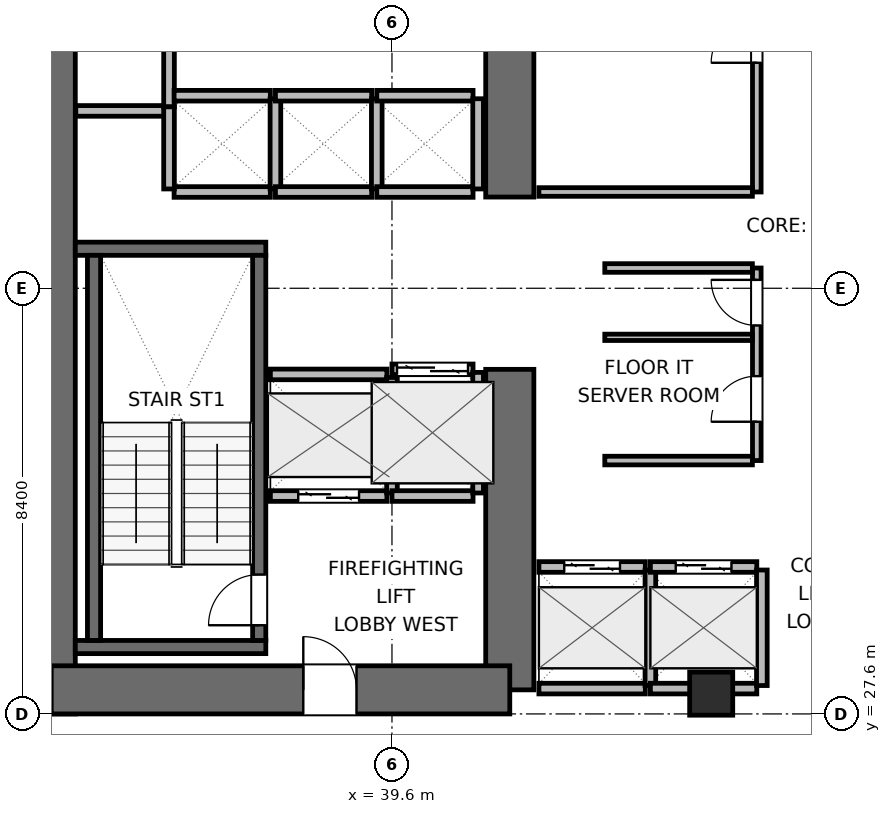
"""IFC4 building model, lengths in metres.
Left out: names, types, materials, properties, quantities, classifications, styles, units other than length and angle.
Written with IfcOpenShell. Run it as: python <this file> out.ifc"""

import sys

from ifc_helpers import new_model, si_unit, direction, frame, frame_2d, origin, origin_2d, place, context, subcontext, project, spatial, rectangle, extrude, element, fill, save


model = new_model("IFC4")
c1 = context("Model", 3, precision=1e-05, world=origin(), true_north=direction((0.0, 1.0)))
c2 = subcontext(c1, "Body", "Model", "MODEL_VIEW")
j1 = project(units=[si_unit("LENGTHUNIT", "METRE"), si_unit("PLANEANGLEUNIT", "RADIAN")], contexts=[c1])
p1 = place(None, origin())
s1 = spatial("IfcSite", under=j1, at=p1, CompositionType="ELEMENT")
p2 = place(p1, origin())
s2 = spatial("IfcBuilding", under=s1, at=p2, CompositionType="ELEMENT")
p3 = place(p2, frame((0.0, 0.0, 48.9)))
s3 = spatial("IfcBuildingStorey", under=s2, at=p3, CompositionType="ELEMENT", Elevation=48.9)
p4 = place(p3, frame((32.875, 27.6, 0.0), z_axis=(0.0, 0.0, 1.0), x_axis=(0.0, 1.0, 0.0)))
e1 = element("IfcWall", 1, at=p4, inside=s3, PredefinedType="SHEAR", context=c2, shape_type="SweptSolid", body=[
    extrude(rectangle(XDim=16.8, YDim=0.95, at=frame_2d((8.4, 0.0))), origin(), (0.0, 0.0, 1.0), 3.9),
])
p5 = place(p3, frame((41.925, 28.075, 0.0), z_axis=(0.0, 0.0, 1.0), x_axis=(0.0, 1.0, 0.0)))
e2 = element("IfcWall", 2, at=p5, inside=s3, PredefinedType="SHEAR", context=c2, shape_type="SweptSolid", body=[
    extrude(rectangle(XDim=6.325, YDim=0.95, at=frame_2d((3.163, 0.0))), origin(), (0.0, 0.0, 1.0), 3.9),
])
p6 = place(p3, frame((41.925, 37.8, 0.0), z_axis=(0.0, 0.0, 1.0), x_axis=(0.0, 1.0, 0.0)))
e3 = element("IfcWall", 3, at=p6, inside=s3, PredefinedType="SHEAR", context=c2, shape_type="SweptSolid", body=[
    extrude(rectangle(XDim=6.125, YDim=0.95, at=frame_2d((3.062, 0.0))), origin(), (0.0, 0.0, 1.0), 3.9),
])
p7 = place(p3, frame((32.875, 28.075, 0.0), z_axis=(0.0, 0.0, 1.0), x_axis=(1.0, 0.0, 0.0)))
e4 = element("IfcWall", 4, at=p7, inside=s3, PredefinedType="SHEAR", context=c2, shape_type="SweptSolid", body=[
    extrude(rectangle(XDim=9.05, YDim=0.95, at=frame_2d((4.525, 0.0))), origin(), (0.0, 0.0, 1.0), 3.9),
])
p8 = place(p7, frame((4.975, 0.0, 0.0)))
e5 = element("IfcOpeningElement", 5, at=p8, cuts=e4, PredefinedType="OPENING", context=c2, shape_type="SweptSolid", body=[
    extrude(rectangle(XDim=1.05, YDim=2.04, at=frame_2d((0.525, 1.02))), frame((0.0, 0.485, 0.0), z_axis=(0.0, -1.0, 0.0), x_axis=(1.0, 0.0, 0.0)), (0.0, 0.0, 1.0), 0.97),
])
for number, where, z_axis, x_axis in (
    (6, (33.35, 28.92, 0.0), (0.0, 0.0, 1.0), (1.0, 0.0, 0.0)),
    (7, (33.35, 36.78, 0.0), (0.0, 0.0, 1.0), (1.0, 0.0, 0.0)),
):
    element("IfcWall", number, at=place(p3, frame(where, z_axis=z_axis, x_axis=x_axis)), inside=s3, PredefinedType="SHEAR", context=c2, shape_type="SweptSolid", body=[
        extrude(rectangle(XDim=3.76, YDim=0.26, at=frame_2d((1.88, 0.0))), origin(), (0.0, 0.0, 1.0), 3.9),
    ])
p9 = place(p3, frame((33.72, 29.05, 0.0), z_axis=(0.0, 0.0, 1.0), x_axis=(0.0, 1.0, 0.0)))
e8 = element("IfcWall", 8, at=p9, inside=s3, PredefinedType="SHEAR", context=c2, shape_type="SweptSolid", body=[
    extrude(rectangle(XDim=7.6, YDim=0.26, at=frame_2d((3.8, 0.0))), origin(), (0.0, 0.0, 1.0), 3.9),
])
p10 = place(p3, frame((36.98, 29.05, 0.0), z_axis=(0.0, 0.0, 1.0), x_axis=(0.0, 1.0, 0.0)))
e9 = element("IfcWall", 9, at=p10, inside=s3, PredefinedType="SHEAR", context=c2, shape_type="SweptSolid", body=[
    extrude(rectangle(XDim=7.6, YDim=0.26, at=frame_2d((3.8, 0.0))), origin(), (0.0, 0.0, 1.0), 3.9),
])
p11 = place(p10, frame((0.3, 0.0, 0.0)))
e10 = element("IfcOpeningElement", 10, at=p11, cuts=e9, PredefinedType="OPENING", context=c2, shape_type="SweptSolid", body=[
    extrude(rectangle(XDim=1.0, YDim=2.04, at=frame_2d((0.5, 1.02))), frame((0.0, 0.14, 0.0), z_axis=(0.0, -1.0, 0.0), x_axis=(1.0, 0.0, 0.0)), (0.0, 0.0, 1.0), 0.28),
])
p12 = place(p3, frame((45.9, 28.0, 0.0), z_axis=(0.0, 0.0, 1.0), x_axis=(1.0, 0.0, 0.0)))
e11 = element("IfcColumn", 11, at=p12, inside=s3, PredefinedType="COLUMN", context=c2, shape_type="SweptSolid", body=[
    extrude(rectangle(XDim=0.85, YDim=0.85, at=origin_2d()), origin(), (0.0, 0.0, 1.0), 3.9),
])
p13 = place(p3, frame((33.36, 39.5, 0.0), z_axis=(0.0, 0.0, 1.0), x_axis=(1.0, 0.0, 0.0)))
e12 = element("IfcWall", 12, at=p13, inside=s3, PredefinedType="PARTITIONING", context=c2, shape_type="SweptSolid", body=[
    extrude(rectangle(XDim=1.86, YDim=0.21, at=frame_2d((0.93, 0.0))), origin(), (0.0, 0.0, 1.0), 3.64),
])
p14 = place(p3, frame((35.2, 39.58, 0.0), z_axis=(0.0, 0.0, 1.0), x_axis=(0.0, 1.0, 0.0)))
e13 = element("IfcWall", 13, at=p14, inside=s3, PredefinedType="PARTITIONING", context=c2, shape_type="SweptSolid", body=[
    extrude(rectangle(XDim=1.32, YDim=0.21, at=frame_2d((0.66, 0.0))), origin(), (0.0, 0.0, 1.0), 3.64),
])
p15 = place(p3, frame((37.2, 31.9, 0.0), z_axis=(0.0, 0.0, 1.0), x_axis=(1.0, 0.0, 0.0)))
e14 = element("IfcWall", 14, at=p15, inside=s3, PredefinedType="PARTITIONING", context=c2, shape_type="SweptSolid", body=[
    extrude(rectangle(XDim=2.3, YDim=0.21, at=frame_2d((1.15, 0.0))), origin(), (0.0, 0.0, 1.0), 3.64),
])
p16 = place(p15, frame((0.55, 0.0, 0.0)))
e15 = element("IfcOpeningElement", 15, at=p16, cuts=e14, PredefinedType="OPENING", context=c2, shape_type="SweptSolid", body=[
    extrude(rectangle(XDim=1.2, YDim=2.04, at=frame_2d((0.6, 1.02))), frame((0.0, 0.115, 0.0), z_axis=(0.0, -1.0, 0.0), x_axis=(1.0, 0.0, 0.0)), (0.0, 0.0, 1.0), 0.23),
])
p17 = place(p3, frame((37.2, 34.3, 0.0), z_axis=(0.0, 0.0, 1.0), x_axis=(1.0, 0.0, 0.0)))
e16 = element("IfcWall", 16, at=p17, inside=s3, PredefinedType="PARTITIONING", context=c2, shape_type="SweptSolid", body=[
    extrude(rectangle(XDim=2.3, YDim=0.21, at=frame_2d((1.15, 0.0))), origin(), (0.0, 0.0, 1.0), 3.64),
])
p18 = place(p3, frame((39.6, 31.96, 0.0), z_axis=(0.0, 0.0, 1.0), x_axis=(0.0, 1.0, 0.0)))
e17 = element("IfcWall", 17, at=p18, inside=s3, PredefinedType="PARTITIONING", context=c2, shape_type="SweptSolid", body=[
    extrude(rectangle(XDim=2.28, YDim=0.21, at=frame_2d((1.14, 0.0))), origin(), (0.0, 0.0, 1.0), 3.64),
])
p19 = place(p3, frame((39.6, 34.4, 0.0), z_axis=(0.0, 0.0, 1.0), x_axis=(1.0, 0.0, 0.0)))
e18 = element("IfcWall", 18, at=p19, inside=s3, PredefinedType="PARTITIONING", context=c2, shape_type="SweptSolid", body=[
    extrude(rectangle(XDim=1.6, YDim=0.21, at=frame_2d((0.8, 0.0))), origin(), (0.0, 0.0, 1.0), 3.64),
])
p20 = place(p19, frame((0.1, 0.0, 0.0)))
e19 = element("IfcOpeningElement", 19, at=p20, cuts=e18, PredefinedType="OPENING", context=c2, shape_type="SweptSolid", body=[
    extrude(rectangle(XDim=1.4, YDim=2.06, at=frame_2d((0.7, 1.03))), frame((0.0, 0.115, 0.0), z_axis=(0.0, -1.0, 0.0), x_axis=(1.0, 0.0, 0.0)), (0.0, 0.0, 1.0), 0.23),
])
p21 = place(p3, frame((39.6, 31.9, 0.0), z_axis=(0.0, 0.0, 1.0), x_axis=(1.0, 0.0, 0.0)))
e20 = element("IfcWall", 20, at=p21, inside=s3, PredefinedType="PARTITIONING", context=c2, shape_type="SweptSolid", body=[
    extrude(rectangle(XDim=1.6, YDim=0.21, at=frame_2d((0.8, 0.0))), origin(), (0.0, 0.0, 1.0), 3.64),
])
p22 = place(p3, frame((41.3, 31.96, 0.0), z_axis=(0.0, 0.0, 1.0), x_axis=(0.0, 1.0, 0.0)))
e21 = element("IfcWall", 21, at=p22, inside=s3, PredefinedType="PARTITIONING", context=c2, shape_type="SweptSolid", body=[
    extrude(rectangle(XDim=2.38, YDim=0.21, at=frame_2d((1.19, 0.0))), origin(), (0.0, 0.0, 1.0), 3.64),
])
p23 = place(p3, frame((42.5, 30.5, 0.0), z_axis=(0.0, 0.0, 1.0), x_axis=(1.0, 0.0, 0.0)))
e22 = element("IfcWall", 22, at=p23, inside=s3, PredefinedType="PARTITIONING", context=c2, shape_type="SweptSolid", body=[
    extrude(rectangle(XDim=2.1, YDim=0.21, at=frame_2d((1.05, 0.0))), origin(), (0.0, 0.0, 1.0), 3.64),
])
p24 = place(p23, frame((0.5, 0.0, 0.0)))
e23 = element("IfcOpeningElement", 23, at=p24, cuts=e22, PredefinedType="OPENING", context=c2, shape_type="SweptSolid", body=[
    extrude(rectangle(XDim=1.1, YDim=2.04, at=frame_2d((0.55, 1.02))), frame((0.0, 0.115, 0.0), z_axis=(0.0, -1.0, 0.0), x_axis=(1.0, 0.0, 0.0)), (0.0, 0.0, 1.0), 0.23),
])
p25 = place(p3, frame((42.5, 28.1, 0.0), z_axis=(0.0, 0.0, 1.0), x_axis=(1.0, 0.0, 0.0)))
e24 = element("IfcWall", 24, at=p25, inside=s3, PredefinedType="PARTITIONING", context=c2, shape_type="SweptSolid", body=[
    extrude(rectangle(XDim=2.1, YDim=0.21, at=frame_2d((1.05, 0.0))), origin(), (0.0, 0.0, 1.0), 2.525),
])
p26 = place(p3, frame((44.7, 28.16, 0.0), z_axis=(0.0, 0.0, 1.0), x_axis=(0.0, 1.0, 0.0)))
e25 = element("IfcWall", 25, at=p26, inside=s3, PredefinedType="PARTITIONING", context=c2, shape_type="SweptSolid", body=[
    extrude(rectangle(XDim=2.28, YDim=0.21, at=frame_2d((1.14, 0.0))), origin(), (0.0, 0.0, 1.0), 3.64),
])
p27 = place(p3, frame((44.7, 30.5, 0.0), z_axis=(0.0, 0.0, 1.0), x_axis=(1.0, 0.0, 0.0)))
e26 = element("IfcWall", 26, at=p27, inside=s3, PredefinedType="PARTITIONING", context=c2, shape_type="SweptSolid", body=[
    extrude(rectangle(XDim=2.1, YDim=0.21, at=frame_2d((1.05, 0.0))), origin(), (0.0, 0.0, 1.0), 3.64),
])
p28 = place(p27, frame((0.5, 0.0, 0.0)))
e27 = element("IfcOpeningElement", 27, at=p28, cuts=e26, PredefinedType="OPENING", context=c2, shape_type="SweptSolid", body=[
    extrude(rectangle(XDim=1.1, YDim=2.04, at=frame_2d((0.55, 1.02))), frame((0.0, 0.115, 0.0), z_axis=(0.0, -1.0, 0.0), x_axis=(1.0, 0.0, 0.0)), (0.0, 0.0, 1.0), 0.23),
])
p29 = place(p3, frame((44.7, 28.1, 0.0), z_axis=(0.0, 0.0, 1.0), x_axis=(1.0, 0.0, 0.0)))
e28 = element("IfcWall", 28, at=p29, inside=s3, PredefinedType="PARTITIONING", context=c2, shape_type="SweptSolid", body=[
    extrude(rectangle(XDim=2.1, YDim=0.21, at=frame_2d((1.05, 0.0))), origin(), (0.0, 0.0, 1.0), 2.525),
])
p30 = place(p3, frame((46.9, 28.16, 0.0), z_axis=(0.0, 0.0, 1.0), x_axis=(0.0, 1.0, 0.0)))
e29 = element("IfcWall", 29, at=p30, inside=s3, PredefinedType="PARTITIONING", context=c2, shape_type="SweptSolid", body=[
    extrude(rectangle(XDim=2.28, YDim=0.21, at=frame_2d((1.14, 0.0))), origin(), (0.0, 0.0, 1.0), 3.64),
])
for number, where, z_axis, x_axis in (
    (30, (35.3, 37.9, 0.0), (0.0, 0.0, 1.0), (1.0, 0.0, 0.0)),
    (31, (35.3, 39.8, 0.0), (0.0, 0.0, 1.0), (1.0, 0.0, 0.0)),
):
    element("IfcWall", number, at=place(p3, frame(where, z_axis=z_axis, x_axis=x_axis)), inside=s3, PredefinedType="PARTITIONING", context=c2, shape_type="SweptSolid", body=[
        extrude(rectangle(XDim=1.9, YDim=0.21, at=frame_2d((0.95, 0.0))), origin(), (0.0, 0.0, 1.0), 3.64),
    ])
p31 = place(p3, frame((35.2, 37.96, 0.0), z_axis=(0.0, 0.0, 1.0), x_axis=(0.0, 1.0, 0.0)))
e32 = element("IfcWall", 32, at=p31, inside=s3, PredefinedType="PARTITIONING", context=c2, shape_type="SweptSolid", body=[
    extrude(rectangle(XDim=1.62, YDim=0.21, at=frame_2d((0.81, 0.0))), origin(), (0.0, 0.0, 1.0), 3.64),
])
p32 = place(p3, frame((37.3, 37.96, 0.0), z_axis=(0.0, 0.0, 1.0), x_axis=(0.0, 1.0, 0.0)))
e33 = element("IfcWall", 33, at=p32, inside=s3, PredefinedType="PARTITIONING", context=c2, shape_type="SweptSolid", body=[
    extrude(rectangle(XDim=1.78, YDim=0.21, at=frame_2d((0.89, 0.0))), origin(), (0.0, 0.0, 1.0), 3.64),
])
for number, where, z_axis, x_axis in (
    (34, (37.3, 37.9, 0.0), (0.0, 0.0, 1.0), (1.0, 0.0, 0.0)),
    (35, (37.3, 39.8, 0.0), (0.0, 0.0, 1.0), (1.0, 0.0, 0.0)),
):
    element("IfcWall", number, at=place(p3, frame(where, z_axis=z_axis, x_axis=x_axis)), inside=s3, PredefinedType="PARTITIONING", context=c2, shape_type="SweptSolid", body=[
        extrude(rectangle(XDim=1.9, YDim=0.21, at=frame_2d((0.95, 0.0))), origin(), (0.0, 0.0, 1.0), 3.64),
    ])
p33 = place(p3, frame((39.3, 37.96, 0.0), z_axis=(0.0, 0.0, 1.0), x_axis=(0.0, 1.0, 0.0)))
e36 = element("IfcWall", 36, at=p33, inside=s3, PredefinedType="PARTITIONING", context=c2, shape_type="SweptSolid", body=[
    extrude(rectangle(XDim=1.78, YDim=0.21, at=frame_2d((0.89, 0.0))), origin(), (0.0, 0.0, 1.0), 3.64),
])
for number, where, z_axis, x_axis in (
    (37, (39.3, 37.9, 0.0), (0.0, 0.0, 1.0), (1.0, 0.0, 0.0)),
    (38, (39.3, 39.8, 0.0), (0.0, 0.0, 1.0), (1.0, 0.0, 0.0)),
):
    element("IfcWall", number, at=place(p3, frame(where, z_axis=z_axis, x_axis=x_axis)), inside=s3, PredefinedType="PARTITIONING", context=c2, shape_type="SweptSolid", body=[
        extrude(rectangle(XDim=1.9, YDim=0.21, at=frame_2d((0.95, 0.0))), origin(), (0.0, 0.0, 1.0), 3.64),
    ])
p34 = place(p3, frame((41.3, 37.96, 0.0), z_axis=(0.0, 0.0, 1.0), x_axis=(0.0, 1.0, 0.0)))
e39 = element("IfcWall", 39, at=p34, inside=s3, PredefinedType="PARTITIONING", context=c2, shape_type="SweptSolid", body=[
    extrude(rectangle(XDim=1.78, YDim=0.21, at=frame_2d((0.89, 0.0))), origin(), (0.0, 0.0, 1.0), 3.64),
])
p35 = place(p3, frame((46.8, 32.6, 0.0), z_axis=(0.0, 0.0, 1.0), x_axis=(0.0, 1.0, 0.0)))
e40 = element("IfcWall", 40, at=p35, inside=s3, PredefinedType="PARTITIONING", context=c2, shape_type="SweptSolid", body=[
    extrude(rectangle(XDim=3.8, YDim=0.17, at=frame_2d((1.9, 0.0))), origin(), (0.0, 0.0, 1.0), 3.64),
])
p36 = place(p35, frame((0.766, 0.0, 0.0)))
e41 = element("IfcOpeningElement", 41, at=p36, cuts=e40, PredefinedType="OPENING", context=c2, shape_type="SweptSolid", body=[
    extrude(rectangle(XDim=0.9, YDim=2.02, at=frame_2d((0.45, 1.01))), frame((0.0, 0.095, 0.0), z_axis=(0.0, -1.0, 0.0), x_axis=(1.0, 0.0, 0.0)), (0.0, 0.0, 1.0), 0.19),
])
p37 = place(p35, frame((2.666, 0.0, 0.0)))
e42 = element("IfcOpeningElement", 42, at=p37, cuts=e40, PredefinedType="OPENING", context=c2, shape_type="SweptSolid", body=[
    extrude(rectangle(XDim=0.9, YDim=2.02, at=frame_2d((0.45, 1.01))), frame((0.0, 0.095, 0.0), z_axis=(0.0, -1.0, 0.0), x_axis=(1.0, 0.0, 0.0)), (0.0, 0.0, 1.0), 0.19),
])
for number, where, z_axis, x_axis in (
    (43, (43.8, 32.6, 0.0), (0.0, 0.0, 1.0), (1.0, 0.0, 0.0)),
    (44, (43.8, 36.4, 0.0), (0.0, 0.0, 1.0), (1.0, 0.0, 0.0)),
):
    element("IfcWall", number, at=place(p3, frame(where, z_axis=z_axis, x_axis=x_axis)), inside=s3, PredefinedType="PARTITIONING", context=c2, shape_type="SweptSolid", body=[
        extrude(rectangle(XDim=2.913, YDim=0.17, at=frame_2d((1.457, 0.0))), origin(), (0.0, 0.0, 1.0), 3.64),
    ])
p38 = place(p3, frame((43.8, 35.032, 0.0), z_axis=(0.0, 0.0, 1.0), x_axis=(1.0, 0.0, 0.0)))
e45 = element("IfcWall", 45, at=p38, inside=s3, PredefinedType="PARTITIONING", context=c2, shape_type="SweptSolid", body=[
    extrude(rectangle(XDim=2.913, YDim=0.125, at=frame_2d((1.457, 0.0))), origin(), (0.0, 0.0, 1.0), 3.64),
])
p39 = place(p3, frame((46.8, 37.9, 0.0), z_axis=(0.0, 0.0, 1.0), x_axis=(0.0, 1.0, 0.0)))
e46 = element("IfcWall", 46, at=p39, inside=s3, PredefinedType="PARTITIONING", context=c2, shape_type="SweptSolid", body=[
    extrude(rectangle(XDim=6.0, YDim=0.17, at=frame_2d((3.0, 0.0))), origin(), (0.0, 0.0, 1.0), 3.64),
])
p40 = place(p39, frame((2.55, 0.0, 0.0)))
e47 = element("IfcOpeningElement", 47, at=p40, cuts=e46, PredefinedType="OPENING", context=c2, shape_type="SweptSolid", body=[
    extrude(rectangle(XDim=0.9, YDim=2.02, at=frame_2d((0.45, 1.01))), frame((0.0, 0.095, 0.0), z_axis=(0.0, -1.0, 0.0), x_axis=(1.0, 0.0, 0.0)), (0.0, 0.0, 1.0), 0.19),
])
p41 = place(p3, frame((42.5, 37.9, 0.0), z_axis=(0.0, 0.0, 1.0), x_axis=(1.0, 0.0, 0.0)))
e48 = element("IfcWall", 48, at=p41, inside=s3, PredefinedType="PARTITIONING", context=c2, shape_type="SweptSolid", body=[
    extrude(rectangle(XDim=4.213, YDim=0.17, at=frame_2d((2.106, 0.0))), origin(), (0.0, 0.0, 1.0), 3.64),
])
p42 = place(p11, origin())
e49 = element("IfcDoor", 49, at=p42, inside=s3, OperationType="SINGLE_SWING_LEFT", PredefinedType="DOOR", context=c2, shape_type="SweptSolid", body=[
    extrude(rectangle(XDim=1.0, YDim=2.04, at=frame_2d((0.5, 1.02))), frame((0.0, 0.025, 0.0), z_axis=(0.0, -1.0, 0.0), x_axis=(1.0, 0.0, 0.0)), (0.0, 0.0, 1.0), 0.05),
])
fill(e10, e49)
p43 = place(p16, origin())
e50 = element("IfcDoor", 50, at=p43, inside=s3, OperationType="DOUBLE_DOOR_SLIDING", PredefinedType="DOOR", context=c2, shape_type="SweptSolid", body=[
    extrude(rectangle(XDim=1.2, YDim=2.04, at=frame_2d((0.6, 1.02))), frame((0.0, 0.025, 0.0), z_axis=(0.0, -1.0, 0.0), x_axis=(1.0, 0.0, 0.0)), (0.0, 0.0, 1.0), 0.05),
])
fill(e15, e50)
p44 = place(p20, origin())
e51 = element("IfcDoor", 51, at=p44, inside=s3, OperationType="DOUBLE_DOOR_SLIDING", PredefinedType="DOOR", context=c2, shape_type="SweptSolid", body=[
    extrude(rectangle(XDim=1.4, YDim=2.06, at=frame_2d((0.7, 1.03))), frame((0.0, 0.025, 0.0), z_axis=(0.0, -1.0, 0.0), x_axis=(1.0, 0.0, 0.0)), (0.0, 0.0, 1.0), 0.05),
])
fill(e19, e51)
p45 = place(p24, origin())
e52 = element("IfcDoor", 52, at=p45, inside=s3, OperationType="DOUBLE_DOOR_SLIDING", PredefinedType="DOOR", context=c2, shape_type="SweptSolid", body=[
    extrude(rectangle(XDim=1.1, YDim=2.04, at=frame_2d((0.55, 1.02))), frame((0.0, 0.025, 0.0), z_axis=(0.0, -1.0, 0.0), x_axis=(1.0, 0.0, 0.0)), (0.0, 0.0, 1.0), 0.05),
])
fill(e23, e52)
p46 = place(p28, origin())
e53 = element("IfcDoor", 53, at=p46, inside=s3, OperationType="DOUBLE_DOOR_SLIDING", PredefinedType="DOOR", context=c2, shape_type="SweptSolid", body=[
    extrude(rectangle(XDim=1.1, YDim=2.04, at=frame_2d((0.55, 1.02))), frame((0.0, 0.025, 0.0), z_axis=(0.0, -1.0, 0.0), x_axis=(1.0, 0.0, 0.0)), (0.0, 0.0, 1.0), 0.05),
])
fill(e27, e53)
p47 = place(p8, origin())
e54 = element("IfcDoor", 54, at=p47, inside=s3, OperationType="SINGLE_SWING_LEFT", PredefinedType="DOOR", context=c2, shape_type="SweptSolid", body=[
    extrude(rectangle(XDim=1.05, YDim=2.04, at=frame_2d((0.525, 1.02))), frame((0.0, 0.025, 0.0), z_axis=(0.0, -1.0, 0.0), x_axis=(1.0, 0.0, 0.0)), (0.0, 0.0, 1.0), 0.05),
])
fill(e5, e54)
p48 = place(p36, origin())
e55 = element("IfcDoor", 55, at=p48, inside=s3, OperationType="SINGLE_SWING_LEFT", PredefinedType="DOOR", context=c2, shape_type="SweptSolid", body=[
    extrude(rectangle(XDim=0.9, YDim=2.02, at=frame_2d((0.45, 1.01))), frame((0.0, 0.025, 0.0), z_axis=(0.0, -1.0, 0.0), x_axis=(1.0, 0.0, 0.0)), (0.0, 0.0, 1.0), 0.05),
])
fill(e41, e55)
p49 = place(p37, origin())
e56 = element("IfcDoor", 56, at=p49, inside=s3, OperationType="SINGLE_SWING_RIGHT", PredefinedType="DOOR", context=c2, shape_type="SweptSolid", body=[
    extrude(rectangle(XDim=0.9, YDim=2.02, at=frame_2d((0.45, 1.01))), frame((0.0, 0.025, 0.0), z_axis=(0.0, -1.0, 0.0), x_axis=(1.0, 0.0, 0.0)), (0.0, 0.0, 1.0), 0.05),
])
fill(e42, e56)
p50 = place(p40, origin())
e57 = element("IfcDoor", 57, at=p50, inside=s3, OperationType="SINGLE_SWING_LEFT", PredefinedType="DOOR", context=c2, shape_type="SweptSolid", body=[
    extrude(rectangle(XDim=0.9, YDim=2.02, at=frame_2d((0.45, 1.01))), frame((0.0, 0.025, 0.0), z_axis=(0.0, -1.0, 0.0), x_axis=(1.0, 0.0, 0.0)), (0.0, 0.0, 1.0), 0.05),
])
fill(e47, e57)
save(model, sys.argv[1])
